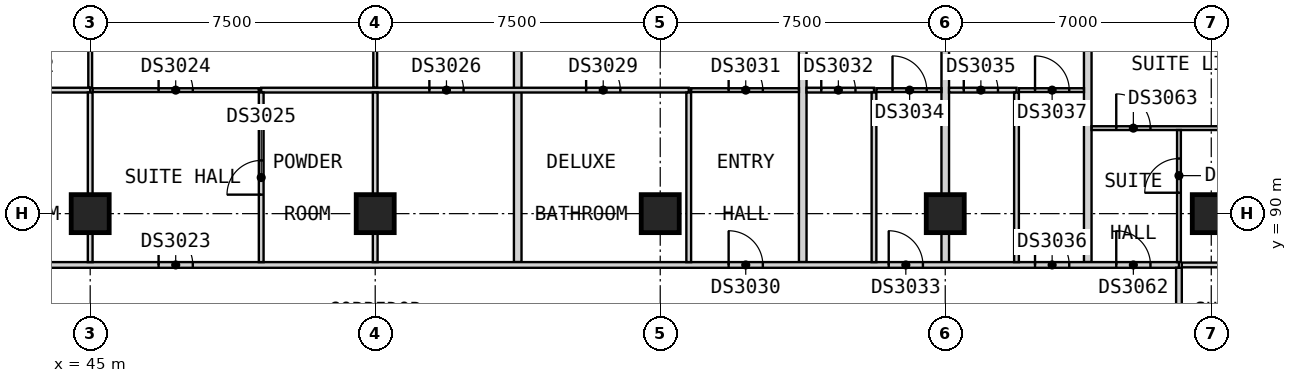
"""IFC4 building model, lengths in metres.
Left out: names, types, materials, properties, quantities, classifications, styles, units other than length and angle.
Written with IfcOpenShell. Run it as: python <this file> out.ifc"""

import sys

from ifc_helpers import new_model, si_unit, direction, frame, frame_2d, origin, origin_2d, place, context, subcontext, project, spatial, rectangle, extrude, element, fill, save


model = new_model("IFC4")
c1 = context("Model", 3, precision=1e-05, world=origin(), true_north=direction((0.0, 1.0)))
c2 = subcontext(c1, "Body", "Model", "MODEL_VIEW")
j1 = project(units=[si_unit("LENGTHUNIT", "METRE"), si_unit("PLANEANGLEUNIT", "RADIAN")], contexts=[c1])
p1 = place(None, origin())
s1 = spatial("IfcSite", under=j1, at=p1, CompositionType="ELEMENT")
p2 = place(p1, origin())
s2 = spatial("IfcBuilding", under=s1, at=p2, CompositionType="ELEMENT")
p3 = place(p2, frame((0.0, 0.0, 137.4)))
s3 = spatial("IfcBuildingStorey", under=s2, at=p3, CompositionType="ELEMENT", Elevation=137.4)
for number, where, z_axis, x_axis in (
    (1, (45.0, 90.0, 0.0), (0.0, 0.0, 1.0), (1.0, 0.0, 0.0)),
    (2, (52.5, 90.0, 0.0), (0.0, 0.0, 1.0), (1.0, 0.0, 0.0)),
    (3, (60.0, 90.0, 0.0), (0.0, 0.0, 1.0), (1.0, 0.0, 0.0)),
    (4, (67.5, 90.0, 0.0), (0.0, 0.0, 1.0), (1.0, 0.0, 0.0)),
    (5, (74.5, 90.0, 0.0), (0.0, 0.0, 1.0), (1.0, 0.0, 0.0)),
):
    element("IfcColumn", number, at=place(p3, frame(where, z_axis=z_axis, x_axis=x_axis)), inside=s3, PredefinedType="COLUMN", context=c2, shape_type="SweptSolid", body=[
        extrude(rectangle(XDim=1.0, YDim=1.0, at=origin_2d()), origin(), (0.0, 0.0, 1.0), 3.6),
    ])
for number, where, z_axis, x_axis in (
    (6, (56.25, 88.725, 0.0), (0.0, 0.0, 1.0), (0.0, 1.0, 0.0)),
    (7, (63.75, 88.725, 0.0), (0.0, 0.0, 1.0), (0.0, 1.0, 0.0)),
):
    element("IfcWall", number, at=place(p3, frame(where, z_axis=z_axis, x_axis=x_axis)), inside=s3, PredefinedType="PARTITIONING", context=c2, shape_type="SweptSolid", body=[
        extrude(rectangle(XDim=11.715, YDim=0.2, at=frame_2d((5.857, 0.0))), origin(), (0.0, 0.0, 1.0), 3.35),
    ])
p4 = place(p3, frame((67.5, 88.725, 0.0), z_axis=(0.0, 0.0, 1.0), x_axis=(0.0, 1.0, 0.0)))
e8 = element("IfcWall", 8, at=p4, inside=s3, PredefinedType="PARTITIONING", context=c2, shape_type="SweptSolid", body=[
    extrude(rectangle(XDim=12.525, YDim=0.2, at=frame_2d((6.262, 0.0))), origin(), (0.0, 0.0, 1.0), 3.35),
])
p5 = place(p3, frame((71.25, 88.725, 0.0), z_axis=(0.0, 0.0, 1.0), x_axis=(0.0, 1.0, 0.0)))
e9 = element("IfcWall", 9, at=p5, inside=s3, PredefinedType="PARTITIONING", context=c2, shape_type="SweptSolid", body=[
    extrude(rectangle(XDim=11.715, YDim=0.2, at=frame_2d((5.857, 0.0))), origin(), (0.0, 0.0, 1.0), 3.35),
])
p6 = place(p3, frame((33.75, 88.65, 0.0), z_axis=(0.0, 0.0, 1.0), x_axis=(1.0, 0.0, 0.0)))
e10 = element("IfcWall", 10, at=p6, inside=s3, PredefinedType="PARTITIONING", context=c2, shape_type="SweptSolid", body=[
    extrude(rectangle(XDim=39.9, YDim=0.15, at=frame_2d((19.95, 0.0))), origin(), (0.0, 0.0, 1.0), 3.35),
])
p7 = place(p6, frame((5.175, 0.0, 0.0)))
e11 = element("IfcOpeningElement", 11, at=p7, cuts=e10, PredefinedType="OPENING", context=c2, shape_type="SweptSolid", body=[
    extrude(rectangle(XDim=0.9, YDim=2.1, at=frame_2d((0.45, 1.05))), frame((0.0, 0.085, 0.0), z_axis=(0.0, -1.0, 0.0), x_axis=(1.0, 0.0, 0.0)), (0.0, 0.0, 1.0), 0.17),
])
p8 = place(p6, frame((13.05, 0.0, 0.0)))
e12 = element("IfcOpeningElement", 12, at=p8, cuts=e10, PredefinedType="OPENING", context=c2, shape_type="SweptSolid", body=[
    extrude(rectangle(XDim=0.9, YDim=2.1, at=frame_2d((0.45, 1.05))), frame((0.0, 0.085, 0.0), z_axis=(0.0, -1.0, 0.0), x_axis=(1.0, 0.0, 0.0)), (0.0, 0.0, 1.0), 0.17),
])
p9 = place(p6, frame((28.05, 0.0, 0.0)))
e13 = element("IfcOpeningElement", 13, at=p9, cuts=e10, PredefinedType="OPENING", context=c2, shape_type="SweptSolid", body=[
    extrude(rectangle(XDim=0.9, YDim=2.1, at=frame_2d((0.45, 1.05))), frame((0.0, 0.085, 0.0), z_axis=(0.0, -1.0, 0.0), x_axis=(1.0, 0.0, 0.0)), (0.0, 0.0, 1.0), 0.17),
])
p10 = place(p6, frame((32.262, 0.0, 0.0)))
e14 = element("IfcOpeningElement", 14, at=p10, cuts=e10, PredefinedType="OPENING", context=c2, shape_type="SweptSolid", body=[
    extrude(rectangle(XDim=0.9, YDim=2.1, at=frame_2d((0.45, 1.05))), frame((0.0, 0.085, 0.0), z_axis=(0.0, -1.0, 0.0), x_axis=(1.0, 0.0, 0.0)), (0.0, 0.0, 1.0), 0.17),
])
p11 = place(p6, frame((36.113, 0.0, 0.0)))
e15 = element("IfcOpeningElement", 15, at=p11, cuts=e10, PredefinedType="OPENING", context=c2, shape_type="SweptSolid", body=[
    extrude(rectangle(XDim=0.9, YDim=2.1, at=frame_2d((0.45, 1.05))), frame((0.0, 0.085, 0.0), z_axis=(0.0, -1.0, 0.0), x_axis=(1.0, 0.0, 0.0)), (0.0, 0.0, 1.0), 0.17),
])
p12 = place(p6, frame((38.25, 0.0, 0.0)))
e16 = element("IfcOpeningElement", 16, at=p12, cuts=e10, PredefinedType="OPENING", context=c2, shape_type="SweptSolid", body=[
    extrude(rectangle(XDim=0.9, YDim=2.1, at=frame_2d((0.45, 1.05))), frame((0.0, 0.085, 0.0), z_axis=(0.0, -1.0, 0.0), x_axis=(1.0, 0.0, 0.0)), (0.0, 0.0, 1.0), 0.17),
])
p13 = place(p3, frame((73.65, 50.175, 0.0), z_axis=(0.0, 0.0, 1.0), x_axis=(0.0, 1.0, 0.0)))
e17 = element("IfcWall", 17, at=p13, inside=s3, PredefinedType="PARTITIONING", context=c2, shape_type="SweptSolid", body=[
    extrude(rectangle(XDim=38.4, YDim=0.15, at=frame_2d((19.2, 0.0))), origin(), (0.0, 0.0, 1.0), 3.35),
])
p14 = place(p13, frame((4.688, 0.0, 0.0)))
e18 = element("IfcOpeningElement", 18, at=p14, cuts=e17, PredefinedType="OPENING", context=c2, shape_type="SweptSolid", body=[
    extrude(rectangle(XDim=0.9, YDim=2.1, at=frame_2d((0.45, 1.05))), frame((0.0, 0.085, 0.0), z_axis=(0.0, -1.0, 0.0), x_axis=(1.0, 0.0, 0.0)), (0.0, 0.0, 1.0), 0.17),
])
p15 = place(p13, frame((11.625, 0.0, 0.0)))
e19 = element("IfcOpeningElement", 19, at=p15, cuts=e17, PredefinedType="OPENING", context=c2, shape_type="SweptSolid", body=[
    extrude(rectangle(XDim=0.9, YDim=2.1, at=frame_2d((0.45, 1.05))), frame((0.0, 0.085, 0.0), z_axis=(0.0, -1.0, 0.0), x_axis=(1.0, 0.0, 0.0)), (0.0, 0.0, 1.0), 0.17),
])
p16 = place(p13, frame((22.875, 0.0, 0.0)))
e20 = element("IfcOpeningElement", 20, at=p16, cuts=e17, PredefinedType="OPENING", context=c2, shape_type="SweptSolid", body=[
    extrude(rectangle(XDim=0.9, YDim=2.1, at=frame_2d((0.45, 1.05))), frame((0.0, 0.085, 0.0), z_axis=(0.0, -1.0, 0.0), x_axis=(1.0, 0.0, 0.0)), (0.0, 0.0, 1.0), 0.17),
])
p17 = place(p13, frame((34.688, 0.0, 0.0)))
e21 = element("IfcOpeningElement", 21, at=p17, cuts=e17, PredefinedType="OPENING", context=c2, shape_type="SweptSolid", body=[
    extrude(rectangle(XDim=0.9, YDim=2.1, at=frame_2d((0.45, 1.05))), frame((0.0, 0.085, 0.0), z_axis=(0.0, -1.0, 0.0), x_axis=(1.0, 0.0, 0.0)), (0.0, 0.0, 1.0), 0.17),
])
p18 = place(p3, frame((71.35, 92.25, 0.0), z_axis=(0.0, 0.0, 1.0), x_axis=(1.0, 0.0, 0.0)))
e22 = element("IfcWall", 22, at=p18, inside=s3, PredefinedType="PARTITIONING", context=c2, shape_type="SweptSolid", body=[
    extrude(rectangle(XDim=7.35, YDim=0.1, at=frame_2d((3.675, 0.0))), origin(), (0.0, 0.0, 1.0), 3.35),
])
p19 = place(p18, frame((0.65, 0.0, 0.0)))
e23 = element("IfcOpeningElement", 23, at=p19, cuts=e22, PredefinedType="OPENING", context=c2, shape_type="SweptSolid", body=[
    extrude(rectangle(XDim=0.9, YDim=2.1, at=frame_2d((0.45, 1.05))), frame((0.0, 0.06, 0.0), z_axis=(0.0, -1.0, 0.0), x_axis=(1.0, 0.0, 0.0)), (0.0, 0.0, 1.0), 0.12),
])
p20 = place(p3, frame((45.062, 93.25, 0.0), z_axis=(0.0, 0.0, 1.0), x_axis=(1.0, 0.0, 0.0)))
e24 = element("IfcWall", 24, at=p20, inside=s3, PredefinedType="PARTITIONING", context=c2, shape_type="SweptSolid", body=[
    extrude(rectangle(XDim=4.375, YDim=0.1, at=frame_2d((2.188, 0.0))), origin(), (0.0, 0.0, 1.0), 3.35),
])
p21 = place(p20, frame((1.738, 0.0, 0.0)))
e25 = element("IfcOpeningElement", 25, at=p21, cuts=e24, PredefinedType="OPENING", context=c2, shape_type="SweptSolid", body=[
    extrude(rectangle(XDim=0.9, YDim=2.1, at=frame_2d((0.45, 1.05))), frame((0.0, 0.06, 0.0), z_axis=(0.0, -1.0, 0.0), x_axis=(1.0, 0.0, 0.0)), (0.0, 0.0, 1.0), 0.12),
])
p22 = place(p3, frame((60.812, 93.25, 0.0), z_axis=(0.0, 0.0, 1.0), x_axis=(1.0, 0.0, 0.0)))
e26 = element("IfcWall", 26, at=p22, inside=s3, PredefinedType="PARTITIONING", context=c2, shape_type="SweptSolid", body=[
    extrude(rectangle(XDim=2.837, YDim=0.1, at=frame_2d((1.419, 0.0))), origin(), (0.0, 0.0, 1.0), 3.35),
])
p23 = place(p22, frame((0.988, 0.0, 0.0)))
e27 = element("IfcOpeningElement", 27, at=p23, cuts=e26, PredefinedType="OPENING", context=c2, shape_type="SweptSolid", body=[
    extrude(rectangle(XDim=0.9, YDim=2.1, at=frame_2d((0.45, 1.05))), frame((0.0, 0.06, 0.0), z_axis=(0.0, -1.0, 0.0), x_axis=(1.0, 0.0, 0.0)), (0.0, 0.0, 1.0), 0.12),
])
p24 = place(p3, frame((65.688, 93.25, 0.0), z_axis=(0.0, 0.0, 1.0), x_axis=(1.0, 0.0, 0.0)))
e28 = element("IfcWall", 28, at=p24, inside=s3, PredefinedType="PARTITIONING", context=c2, shape_type="SweptSolid", body=[
    extrude(rectangle(XDim=1.712, YDim=0.1, at=frame_2d((0.856, 0.0))), origin(), (0.0, 0.0, 1.0), 3.35),
])
p25 = place(p24, frame((0.425, 0.0, 0.0)))
e29 = element("IfcOpeningElement", 29, at=p25, cuts=e28, PredefinedType="OPENING", context=c2, shape_type="SweptSolid", body=[
    extrude(rectangle(XDim=0.9, YDim=2.1, at=frame_2d((0.45, 1.05))), frame((0.0, 0.06, 0.0), z_axis=(0.0, -1.0, 0.0), x_axis=(1.0, 0.0, 0.0)), (0.0, 0.0, 1.0), 0.12),
])
p26 = place(p3, frame((69.438, 93.25, 0.0), z_axis=(0.0, 0.0, 1.0), x_axis=(1.0, 0.0, 0.0)))
e30 = element("IfcWall", 30, at=p26, inside=s3, PredefinedType="PARTITIONING", context=c2, shape_type="SweptSolid", body=[
    extrude(rectangle(XDim=1.712, YDim=0.1, at=frame_2d((0.856, 0.0))), origin(), (0.0, 0.0, 1.0), 3.35),
])
p27 = place(p26, frame((0.425, 0.0, 0.0)))
e31 = element("IfcOpeningElement", 31, at=p27, cuts=e30, PredefinedType="OPENING", context=c2, shape_type="SweptSolid", body=[
    extrude(rectangle(XDim=0.9, YDim=2.1, at=frame_2d((0.45, 1.05))), frame((0.0, 0.06, 0.0), z_axis=(0.0, -1.0, 0.0), x_axis=(1.0, 0.0, 0.0)), (0.0, 0.0, 1.0), 0.12),
])
p28 = place(p3, frame((45.0, 93.312, 0.0), z_axis=(0.0, 0.0, 1.0), x_axis=(0.0, 1.0, 0.0)))
e32 = element("IfcWall", 32, at=p28, inside=s3, PredefinedType="PARTITIONING", context=c2, shape_type="SweptSolid", body=[
    extrude(rectangle(XDim=7.938, YDim=0.1, at=frame_2d((3.969, 0.0))), origin(), (0.0, 0.0, 1.0), 3.35),
])
p29 = place(p28, frame((4.238, 0.0, 0.0)))
e33 = element("IfcOpeningElement", 33, at=p29, cuts=e32, PredefinedType="OPENING", context=c2, shape_type="SweptSolid", body=[
    extrude(rectangle(XDim=0.9, YDim=2.1, at=frame_2d((0.45, 1.05))), frame((0.0, 0.06, 0.0), z_axis=(0.0, -1.0, 0.0), x_axis=(1.0, 0.0, 0.0)), (0.0, 0.0, 1.0), 0.12),
])
p30 = place(p3, frame((52.5, 93.312, 0.0), z_axis=(0.0, 0.0, 1.0), x_axis=(0.0, 1.0, 0.0)))
e34 = element("IfcWall", 34, at=p30, inside=s3, PredefinedType="PARTITIONING", context=c2, shape_type="SweptSolid", body=[
    extrude(rectangle(XDim=7.938, YDim=0.1, at=frame_2d((3.969, 0.0))), origin(), (0.0, 0.0, 1.0), 3.35),
])
p31 = place(p30, frame((4.238, 0.0, 0.0)))
e35 = element("IfcOpeningElement", 35, at=p31, cuts=e34, PredefinedType="OPENING", context=c2, shape_type="SweptSolid", body=[
    extrude(rectangle(XDim=0.9, YDim=2.1, at=frame_2d((0.45, 1.05))), frame((0.0, 0.06, 0.0), z_axis=(0.0, -1.0, 0.0), x_axis=(1.0, 0.0, 0.0)), (0.0, 0.0, 1.0), 0.12),
])
p32 = place(p3, frame((73.65, 88.725, 0.0), z_axis=(0.0, 0.0, 1.0), x_axis=(0.0, 1.0, 0.0)))
e36 = element("IfcWall", 36, at=p32, inside=s3, PredefinedType="PARTITIONING", context=c2, shape_type="SweptSolid", body=[
    extrude(rectangle(XDim=3.475, YDim=0.1, at=frame_2d((1.737, 0.0))), origin(), (0.0, 0.0, 1.0), 3.35),
])
p33 = place(p32, frame((1.825, 0.0, 0.0)))
e37 = element("IfcOpeningElement", 37, at=p33, cuts=e36, PredefinedType="OPENING", context=c2, shape_type="SweptSolid", body=[
    extrude(rectangle(XDim=0.9, YDim=2.1, at=frame_2d((0.45, 1.05))), frame((0.0, 0.06, 0.0), z_axis=(0.0, -1.0, 0.0), x_axis=(1.0, 0.0, 0.0)), (0.0, 0.0, 1.0), 0.12),
])
p34 = place(p3, frame((73.725, 88.65, 0.0), z_axis=(0.0, 0.0, 1.0), x_axis=(1.0, 0.0, 0.0)))
e38 = element("IfcWall", 38, at=p34, inside=s3, PredefinedType="PARTITIONING", context=c2, shape_type="SweptSolid", body=[
    extrude(rectangle(XDim=5.025, YDim=0.125, at=frame_2d((2.512, 0.0))), origin(), (0.0, 0.0, 1.0), 3.35),
])
p35 = place(p3, frame((41.35, 93.25, 0.0), z_axis=(0.0, 0.0, 1.0), x_axis=(1.0, 0.0, 0.0)))
e39 = element("IfcWall", 39, at=p35, inside=s3, PredefinedType="PARTITIONING", context=c2, shape_type="SweptSolid", body=[
    extrude(rectangle(XDim=3.65, YDim=0.125, at=frame_2d((1.825, 0.0))), origin(), (0.0, 0.0, 1.0), 3.35),
])
p36 = place(p35, frame((1.325, 0.0, 0.0)))
e40 = element("IfcOpeningElement", 40, at=p36, cuts=e39, PredefinedType="OPENING", context=c2, shape_type="SweptSolid", body=[
    extrude(rectangle(XDim=0.9, YDim=2.1, at=frame_2d((0.45, 1.05))), frame((0.0, 0.073, 0.0), z_axis=(0.0, -1.0, 0.0), x_axis=(1.0, 0.0, 0.0)), (0.0, 0.0, 1.0), 0.145),
])
p37 = place(p3, frame((49.5, 93.25, 0.0), z_axis=(0.0, 0.0, 1.0), x_axis=(1.0, 0.0, 0.0)))
e41 = element("IfcWall", 41, at=p37, inside=s3, PredefinedType="PARTITIONING", context=c2, shape_type="SweptSolid", body=[
    extrude(rectangle(XDim=11.25, YDim=0.125, at=frame_2d((5.625, 0.0))), origin(), (0.0, 0.0, 1.0), 3.35),
])
p38 = place(p37, frame((4.425, 0.0, 0.0)))
e42 = element("IfcOpeningElement", 42, at=p38, cuts=e41, PredefinedType="OPENING", context=c2, shape_type="SweptSolid", body=[
    extrude(rectangle(XDim=0.9, YDim=2.1, at=frame_2d((0.45, 1.05))), frame((0.0, 0.073, 0.0), z_axis=(0.0, -1.0, 0.0), x_axis=(1.0, 0.0, 0.0)), (0.0, 0.0, 1.0), 0.145),
])
p39 = place(p37, frame((8.55, 0.0, 0.0)))
e43 = element("IfcOpeningElement", 43, at=p39, cuts=e41, PredefinedType="OPENING", context=c2, shape_type="SweptSolid", body=[
    extrude(rectangle(XDim=0.9, YDim=2.1, at=frame_2d((0.45, 1.05))), frame((0.0, 0.073, 0.0), z_axis=(0.0, -1.0, 0.0), x_axis=(1.0, 0.0, 0.0)), (0.0, 0.0, 1.0), 0.145),
])
p40 = place(p3, frame((63.85, 93.25, 0.0), z_axis=(0.0, 0.0, 1.0), x_axis=(1.0, 0.0, 0.0)))
e44 = element("IfcWall", 44, at=p40, inside=s3, PredefinedType="PARTITIONING", context=c2, shape_type="SweptSolid", body=[
    extrude(rectangle(XDim=1.775, YDim=0.125, at=frame_2d((0.887, 0.0))), origin(), (0.0, 0.0, 1.0), 3.35),
])
p41 = place(p40, frame((0.387, 0.0, 0.0)))
e45 = element("IfcOpeningElement", 45, at=p41, cuts=e44, PredefinedType="OPENING", context=c2, shape_type="SweptSolid", body=[
    extrude(rectangle(XDim=0.9, YDim=2.1, at=frame_2d((0.45, 1.05))), frame((0.0, 0.073, 0.0), z_axis=(0.0, -1.0, 0.0), x_axis=(1.0, 0.0, 0.0)), (0.0, 0.0, 1.0), 0.145),
])
p42 = place(p3, frame((67.6, 93.25, 0.0), z_axis=(0.0, 0.0, 1.0), x_axis=(1.0, 0.0, 0.0)))
e46 = element("IfcWall", 46, at=p42, inside=s3, PredefinedType="PARTITIONING", context=c2, shape_type="SweptSolid", body=[
    extrude(rectangle(XDim=1.775, YDim=0.125, at=frame_2d((0.887, 0.0))), origin(), (0.0, 0.0, 1.0), 3.35),
])
p43 = place(p42, frame((0.387, 0.0, 0.0)))
e47 = element("IfcOpeningElement", 47, at=p43, cuts=e46, PredefinedType="OPENING", context=c2, shape_type="SweptSolid", body=[
    extrude(rectangle(XDim=0.9, YDim=2.1, at=frame_2d((0.45, 1.05))), frame((0.0, 0.073, 0.0), z_axis=(0.0, -1.0, 0.0), x_axis=(1.0, 0.0, 0.0)), (0.0, 0.0, 1.0), 0.145),
])
p44 = place(p3, frame((45.0, 88.725, 0.0), z_axis=(0.0, 0.0, 1.0), x_axis=(0.0, 1.0, 0.0)))
e48 = element("IfcWall", 48, at=p44, inside=s3, PredefinedType="PARTITIONING", context=c2, shape_type="SweptSolid", body=[
    extrude(rectangle(XDim=4.462, YDim=0.125, at=frame_2d((2.231, 0.0))), origin(), (0.0, 0.0, 1.0), 3.35),
])
p45 = place(p3, frame((49.5, 88.725, 0.0), z_axis=(0.0, 0.0, 1.0), x_axis=(0.0, 1.0, 0.0)))
e49 = element("IfcWall", 49, at=p45, inside=s3, PredefinedType="PARTITIONING", context=c2, shape_type="SweptSolid", body=[
    extrude(rectangle(XDim=4.462, YDim=0.125, at=frame_2d((2.231, 0.0))), origin(), (0.0, 0.0, 1.0), 3.35),
])
p46 = place(p45, frame((1.775, 0.0, 0.0)))
e50 = element("IfcOpeningElement", 50, at=p46, cuts=e49, PredefinedType="OPENING", context=c2, shape_type="SweptSolid", body=[
    extrude(rectangle(XDim=0.9, YDim=2.1, at=frame_2d((0.45, 1.05))), frame((0.0, 0.073, 0.0), z_axis=(0.0, -1.0, 0.0), x_axis=(1.0, 0.0, 0.0)), (0.0, 0.0, 1.0), 0.145),
])
for number, where, z_axis, x_axis in (
    (51, (52.5, 88.725, 0.0), (0.0, 0.0, 1.0), (0.0, 1.0, 0.0)),
    (52, (60.75, 88.725, 0.0), (0.0, 0.0, 1.0), (0.0, 1.0, 0.0)),
    (53, (65.625, 88.725, 0.0), (0.0, 0.0, 1.0), (0.0, 1.0, 0.0)),
    (54, (69.375, 88.725, 0.0), (0.0, 0.0, 1.0), (0.0, 1.0, 0.0)),
):
    element("IfcWall", number, at=place(p3, frame(where, z_axis=z_axis, x_axis=x_axis)), inside=s3, PredefinedType="PARTITIONING", context=c2, shape_type="SweptSolid", body=[
        extrude(rectangle(XDim=4.462, YDim=0.125, at=frame_2d((2.231, 0.0))), origin(), (0.0, 0.0, 1.0), 3.35),
    ])
p47 = place(p8, origin())
e55 = element("IfcDoor", 55, at=p47, inside=s3, OperationType="SINGLE_SWING_LEFT", PredefinedType="DOOR", context=c2, shape_type="SweptSolid", body=[
    extrude(rectangle(XDim=0.9, YDim=2.1, at=frame_2d((0.45, 1.05))), frame((0.0, 0.025, 0.0), z_axis=(0.0, -1.0, 0.0), x_axis=(1.0, 0.0, 0.0)), (0.0, 0.0, 1.0), 0.05),
])
fill(e12, e55)
p48 = place(p21, origin())
e56 = element("IfcDoor", 56, at=p48, inside=s3, OperationType="SINGLE_SWING_RIGHT", PredefinedType="DOOR", context=c2, shape_type="SweptSolid", body=[
    extrude(rectangle(XDim=0.9, YDim=2.1, at=frame_2d((0.45, 1.05))), frame((0.0, 0.025, 0.0), z_axis=(0.0, -1.0, 0.0), x_axis=(1.0, 0.0, 0.0)), (0.0, 0.0, 1.0), 0.05),
])
fill(e25, e56)
p49 = place(p46, origin())
e57 = element("IfcDoor", 57, at=p49, inside=s3, OperationType="SINGLE_SWING_LEFT", PredefinedType="DOOR", context=c2, shape_type="SweptSolid", body=[
    extrude(rectangle(XDim=0.9, YDim=2.1, at=frame_2d((0.45, 1.05))), frame((0.0, 0.025, 0.0), z_axis=(0.0, -1.0, 0.0), x_axis=(1.0, 0.0, 0.0)), (0.0, 0.0, 1.0), 0.05),
])
fill(e50, e57)
p50 = place(p38, origin())
e58 = element("IfcDoor", 58, at=p50, inside=s3, OperationType="SINGLE_SWING_RIGHT", PredefinedType="DOOR", context=c2, shape_type="SweptSolid", body=[
    extrude(rectangle(XDim=0.9, YDim=2.1, at=frame_2d((0.45, 1.05))), frame((0.0, 0.025, 0.0), z_axis=(0.0, -1.0, 0.0), x_axis=(1.0, 0.0, 0.0)), (0.0, 0.0, 1.0), 0.05),
])
fill(e42, e58)
p51 = place(p39, origin())
e59 = element("IfcDoor", 59, at=p51, inside=s3, OperationType="SINGLE_SWING_RIGHT", PredefinedType="DOOR", context=c2, shape_type="SweptSolid", body=[
    extrude(rectangle(XDim=0.9, YDim=2.1, at=frame_2d((0.45, 1.05))), frame((0.0, 0.025, 0.0), z_axis=(0.0, -1.0, 0.0), x_axis=(1.0, 0.0, 0.0)), (0.0, 0.0, 1.0), 0.05),
])
fill(e43, e59)
p52 = place(p9, origin())
e60 = element("IfcDoor", 60, at=p52, inside=s3, OperationType="SINGLE_SWING_LEFT", PredefinedType="DOOR", context=c2, shape_type="SweptSolid", body=[
    extrude(rectangle(XDim=0.9, YDim=2.1, at=frame_2d((0.45, 1.05))), frame((0.0, 0.025, 0.0), z_axis=(0.0, -1.0, 0.0), x_axis=(1.0, 0.0, 0.0)), (0.0, 0.0, 1.0), 0.05),
])
fill(e13, e60)
p53 = place(p23, origin())
e61 = element("IfcDoor", 61, at=p53, inside=s3, OperationType="SINGLE_SWING_RIGHT", PredefinedType="DOOR", context=c2, shape_type="SweptSolid", body=[
    extrude(rectangle(XDim=0.9, YDim=2.1, at=frame_2d((0.45, 1.05))), frame((0.0, 0.025, 0.0), z_axis=(0.0, -1.0, 0.0), x_axis=(1.0, 0.0, 0.0)), (0.0, 0.0, 1.0), 0.05),
])
fill(e27, e61)
p54 = place(p41, origin())
e62 = element("IfcDoor", 62, at=p54, inside=s3, OperationType="SINGLE_SWING_RIGHT", PredefinedType="DOOR", context=c2, shape_type="SweptSolid", body=[
    extrude(rectangle(XDim=0.9, YDim=2.1, at=frame_2d((0.45, 1.05))), frame((0.0, 0.025, 0.0), z_axis=(0.0, -1.0, 0.0), x_axis=(1.0, 0.0, 0.0)), (0.0, 0.0, 1.0), 0.05),
])
fill(e45, e62)
p55 = place(p10, origin())
e63 = element("IfcDoor", 63, at=p55, inside=s3, OperationType="SINGLE_SWING_LEFT", PredefinedType="DOOR", context=c2, shape_type="SweptSolid", body=[
    extrude(rectangle(XDim=0.9, YDim=2.1, at=frame_2d((0.45, 1.05))), frame((0.0, 0.025, 0.0), z_axis=(0.0, -1.0, 0.0), x_axis=(1.0, 0.0, 0.0)), (0.0, 0.0, 1.0), 0.05),
])
fill(e14, e63)
p56 = place(p25, origin())
e64 = element("IfcDoor", 64, at=p56, inside=s3, OperationType="SINGLE_SWING_RIGHT", PredefinedType="DOOR", context=c2, shape_type="SweptSolid", body=[
    extrude(rectangle(XDim=0.9, YDim=2.1, at=frame_2d((0.45, 1.05))), frame((0.0, 0.025, 0.0), z_axis=(0.0, -1.0, 0.0), x_axis=(1.0, 0.0, 0.0)), (0.0, 0.0, 1.0), 0.05),
])
fill(e29, e64)
p57 = place(p43, origin())
e65 = element("IfcDoor", 65, at=p57, inside=s3, OperationType="SINGLE_SWING_RIGHT", PredefinedType="DOOR", context=c2, shape_type="SweptSolid", body=[
    extrude(rectangle(XDim=0.9, YDim=2.1, at=frame_2d((0.45, 1.05))), frame((0.0, 0.025, 0.0), z_axis=(0.0, -1.0, 0.0), x_axis=(1.0, 0.0, 0.0)), (0.0, 0.0, 1.0), 0.05),
])
fill(e47, e65)
p58 = place(p11, origin())
e66 = element("IfcDoor", 66, at=p58, inside=s3, OperationType="SINGLE_SWING_LEFT", PredefinedType="DOOR", context=c2, shape_type="SweptSolid", body=[
    extrude(rectangle(XDim=0.9, YDim=2.1, at=frame_2d((0.45, 1.05))), frame((0.0, 0.025, 0.0), z_axis=(0.0, -1.0, 0.0), x_axis=(1.0, 0.0, 0.0)), (0.0, 0.0, 1.0), 0.05),
])
fill(e15, e66)
p59 = place(p27, origin())
e67 = element("IfcDoor", 67, at=p59, inside=s3, OperationType="SINGLE_SWING_RIGHT", PredefinedType="DOOR", context=c2, shape_type="SweptSolid", body=[
    extrude(rectangle(XDim=0.9, YDim=2.1, at=frame_2d((0.45, 1.05))), frame((0.0, 0.025, 0.0), z_axis=(0.0, -1.0, 0.0), x_axis=(1.0, 0.0, 0.0)), (0.0, 0.0, 1.0), 0.05),
])
fill(e31, e67)
p60 = place(p12, origin())
e68 = element("IfcDoor", 68, at=p60, inside=s3, OperationType="SINGLE_SWING_RIGHT", PredefinedType="DOOR", context=c2, shape_type="SweptSolid", body=[
    extrude(rectangle(XDim=0.9, YDim=2.1, at=frame_2d((0.45, 1.05))), frame((0.0, 0.025, 0.0), z_axis=(0.0, -1.0, 0.0), x_axis=(1.0, 0.0, 0.0)), (0.0, 0.0, 1.0), 0.05),
])
fill(e16, e68)
p61 = place(p19, origin())
e69 = element("IfcDoor", 69, at=p61, inside=s3, OperationType="SINGLE_SWING_LEFT", PredefinedType="DOOR", context=c2, shape_type="SweptSolid", body=[
    extrude(rectangle(XDim=0.9, YDim=2.1, at=frame_2d((0.45, 1.05))), frame((0.0, 0.025, 0.0), z_axis=(0.0, -1.0, 0.0), x_axis=(1.0, 0.0, 0.0)), (0.0, 0.0, 1.0), 0.05),
])
fill(e23, e69)
p62 = place(p33, origin())
e70 = element("IfcDoor", 70, at=p62, inside=s3, OperationType="SINGLE_SWING_RIGHT", PredefinedType="DOOR", context=c2, shape_type="SweptSolid", body=[
    extrude(rectangle(XDim=0.9, YDim=2.1, at=frame_2d((0.45, 1.05))), frame((0.0, 0.025, 0.0), z_axis=(0.0, -1.0, 0.0), x_axis=(1.0, 0.0, 0.0)), (0.0, 0.0, 1.0), 0.05),
])
fill(e37, e70)
save(model, sys.argv[1])
